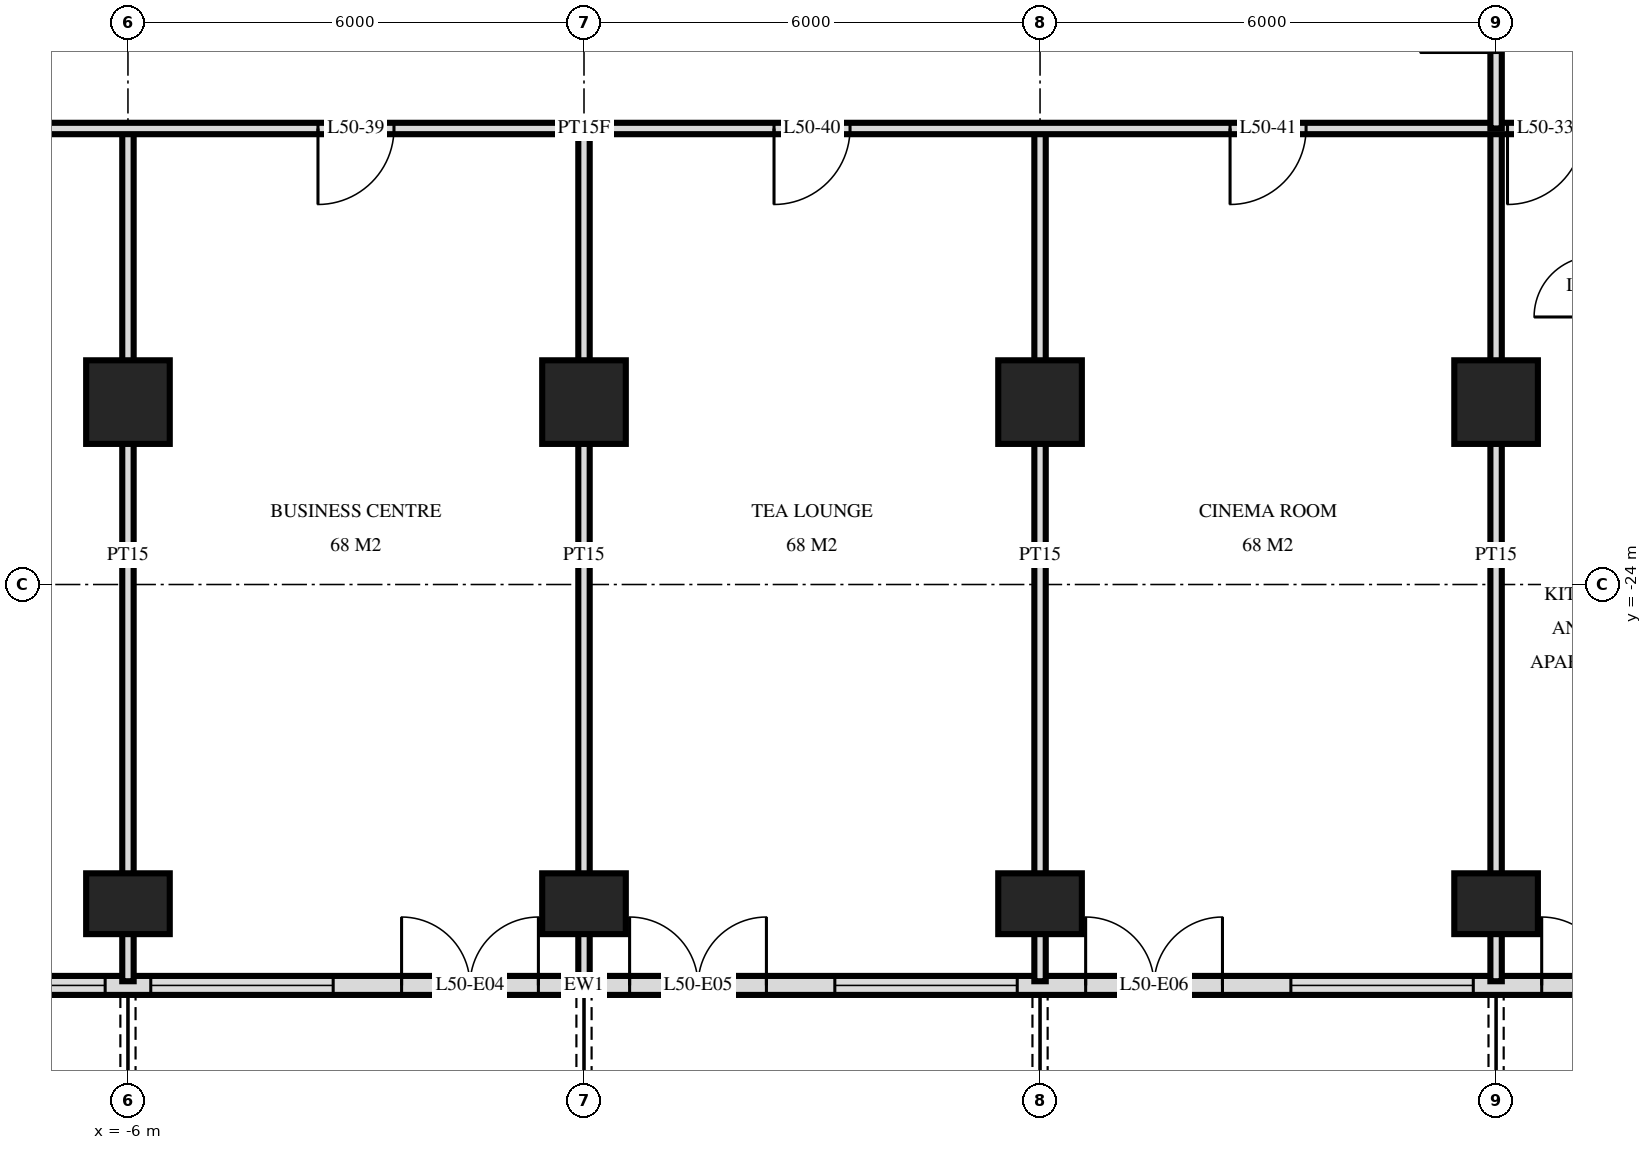
"""IFC4 building model, lengths in metres.
Left out: names, types, materials, properties, quantities, classifications, styles, units other than length and angle.
Written with IfcOpenShell. Run it as: python <this file> out.ifc"""

import sys

from ifc_helpers import new_model, si_unit, direction, frame, frame_2d, origin, origin_2d, place, context, subcontext, project, spatial, rectangle, extrude, element, fill, save


model = new_model("IFC4")
c1 = context("Model", 3, precision=1e-05, world=origin(), true_north=direction((0.0, 1.0)))
c2 = subcontext(c1, "Body", "Model", "MODEL_VIEW")
j1 = project(units=[si_unit("LENGTHUNIT", "METRE"), si_unit("PLANEANGLEUNIT", "RADIAN")], contexts=[c1])
p1 = place(None, origin())
s1 = spatial("IfcSite", under=j1, at=p1, CompositionType="ELEMENT")
p2 = place(p1, origin())
s2 = spatial("IfcBuilding", under=s1, at=p2, CompositionType="ELEMENT")
p3 = place(p2, frame((0.0, 0.0, 194.1)))
s3 = spatial("IfcBuildingStorey", under=s2, at=p3, CompositionType="ELEMENT", Elevation=194.1)
p4 = place(p3, frame((-6.0, -28.2, 0.0), z_axis=(0.0, 0.0, 1.0), x_axis=(1.0, 0.0, 0.0)))
e1 = element("IfcColumn", 1, at=p4, inside=s3, PredefinedType="COLUMN", context=c2, shape_type="SweptSolid", body=[
    extrude(rectangle(XDim=1.1, YDim=0.8, at=origin_2d()), origin(), (0.0, 0.0, 1.0), 3.5),
])
p5 = place(p3, frame((-6.0, -21.6, 0.0), z_axis=(0.0, 0.0, 1.0), x_axis=(1.0, 0.0, 0.0)))
e2 = element("IfcColumn", 2, at=p5, inside=s3, PredefinedType="COLUMN", context=c2, shape_type="SweptSolid", body=[
    extrude(rectangle(XDim=1.1, YDim=1.1, at=origin_2d()), origin(), (0.0, 0.0, 1.0), 3.5),
])
p6 = place(p3, frame((0.0, -28.2, 0.0), z_axis=(0.0, 0.0, 1.0), x_axis=(1.0, 0.0, 0.0)))
e3 = element("IfcColumn", 3, at=p6, inside=s3, PredefinedType="COLUMN", context=c2, shape_type="SweptSolid", body=[
    extrude(rectangle(XDim=1.1, YDim=0.8, at=origin_2d()), origin(), (0.0, 0.0, 1.0), 3.5),
])
p7 = place(p3, frame((0.0, -21.6, 0.0), z_axis=(0.0, 0.0, 1.0), x_axis=(1.0, 0.0, 0.0)))
e4 = element("IfcColumn", 4, at=p7, inside=s3, PredefinedType="COLUMN", context=c2, shape_type="SweptSolid", body=[
    extrude(rectangle(XDim=1.1, YDim=1.1, at=origin_2d()), origin(), (0.0, 0.0, 1.0), 3.5),
])
p8 = place(p3, frame((6.0, -28.2, 0.0), z_axis=(0.0, 0.0, 1.0), x_axis=(1.0, 0.0, 0.0)))
e5 = element("IfcColumn", 5, at=p8, inside=s3, PredefinedType="COLUMN", context=c2, shape_type="SweptSolid", body=[
    extrude(rectangle(XDim=1.1, YDim=0.8, at=origin_2d()), origin(), (0.0, 0.0, 1.0), 3.5),
])
p9 = place(p3, frame((6.0, -21.6, 0.0), z_axis=(0.0, 0.0, 1.0), x_axis=(1.0, 0.0, 0.0)))
e6 = element("IfcColumn", 6, at=p9, inside=s3, PredefinedType="COLUMN", context=c2, shape_type="SweptSolid", body=[
    extrude(rectangle(XDim=1.1, YDim=1.1, at=origin_2d()), origin(), (0.0, 0.0, 1.0), 3.5),
])
p10 = place(p3, frame((12.0, -28.2, 0.0), z_axis=(0.0, 0.0, 1.0), x_axis=(1.0, 0.0, 0.0)))
e7 = element("IfcColumn", 7, at=p10, inside=s3, PredefinedType="COLUMN", context=c2, shape_type="SweptSolid", body=[
    extrude(rectangle(XDim=1.1, YDim=0.8, at=origin_2d()), origin(), (0.0, 0.0, 1.0), 3.5),
])
p11 = place(p3, frame((12.0, -21.6, 0.0), z_axis=(0.0, 0.0, 1.0), x_axis=(1.0, 0.0, 0.0)))
e8 = element("IfcColumn", 8, at=p11, inside=s3, PredefinedType="COLUMN", context=c2, shape_type="SweptSolid", body=[
    extrude(rectangle(XDim=1.1, YDim=1.1, at=origin_2d()), origin(), (0.0, 0.0, 1.0), 3.5),
])
p12 = place(p3, frame((-22.475, -29.275, 0.0), z_axis=(0.0, 0.0, 1.0), x_axis=(1.0, 0.0, 0.0)))
e9 = element("IfcWall", 9, at=p12, inside=s3, PredefinedType="SOLIDWALL", context=c2, shape_type="SweptSolid", body=[
    extrude(rectangle(XDim=44.951, YDim=0.25, at=frame_2d((22.475, 0.0))), origin(), (0.0, 0.0, 1.0), 3.22),
])
p13 = place(p12, frame((0.575, 0.0, 0.0)))
e10 = element("IfcOpeningElement", 10, at=p13, cuts=e9, PredefinedType="OPENING", context=c2, shape_type="SweptSolid", body=[
    extrude(rectangle(XDim=1.8, YDim=2.4, at=frame_2d((0.9, 1.2))), frame((0.0, 0.135, 0.0), z_axis=(0.0, -1.0, 0.0), x_axis=(1.0, 0.0, 0.0)), (0.0, 0.0, 1.0), 0.27),
])
p14 = place(p12, frame((6.575, 0.0, 0.0)))
e11 = element("IfcOpeningElement", 11, at=p14, cuts=e9, PredefinedType="OPENING", context=c2, shape_type="SweptSolid", body=[
    extrude(rectangle(XDim=1.8, YDim=2.4, at=frame_2d((0.9, 1.2))), frame((0.0, 0.135, 0.0), z_axis=(0.0, -1.0, 0.0), x_axis=(1.0, 0.0, 0.0)), (0.0, 0.0, 1.0), 0.27),
])
p15 = place(p12, frame((11.075, 0.0, 0.0)))
e12 = element("IfcOpeningElement", 12, at=p15, cuts=e9, PredefinedType="OPENING", context=c2, shape_type="SweptSolid", body=[
    extrude(rectangle(XDim=1.8, YDim=2.4, at=frame_2d((0.9, 1.2))), frame((0.0, 0.135, 0.0), z_axis=(0.0, -1.0, 0.0), x_axis=(1.0, 0.0, 0.0)), (0.0, 0.0, 1.0), 0.27),
])
p16 = place(p12, frame((13.775, 0.0, 0.9)))
e13 = element("IfcOpeningElement", 13, at=p16, cuts=e9, PredefinedType="OPENING", context=c2, shape_type="SweptSolid", body=[
    extrude(rectangle(XDim=2.4, YDim=1.5, at=frame_2d((1.2, 0.75))), frame((0.0, 0.135, 0.0), z_axis=(0.0, -1.0, 0.0), x_axis=(1.0, 0.0, 0.0)), (0.0, 0.0, 1.0), 0.27),
])
p17 = place(p12, frame((16.775, 0.0, 0.9)))
e14 = element("IfcOpeningElement", 14, at=p17, cuts=e9, PredefinedType="OPENING", context=c2, shape_type="SweptSolid", body=[
    extrude(rectangle(XDim=2.4, YDim=1.5, at=frame_2d((1.2, 0.75))), frame((0.0, 0.135, 0.0), z_axis=(0.0, -1.0, 0.0), x_axis=(1.0, 0.0, 0.0)), (0.0, 0.0, 1.0), 0.27),
])
p18 = place(p12, frame((20.075, 0.0, 0.0)))
e15 = element("IfcOpeningElement", 15, at=p18, cuts=e9, PredefinedType="OPENING", context=c2, shape_type="SweptSolid", body=[
    extrude(rectangle(XDim=1.8, YDim=2.4, at=frame_2d((0.9, 1.2))), frame((0.0, 0.135, 0.0), z_axis=(0.0, -1.0, 0.0), x_axis=(1.0, 0.0, 0.0)), (0.0, 0.0, 1.0), 0.27),
])
p19 = place(p12, frame((23.075, 0.0, 0.0)))
e16 = element("IfcOpeningElement", 16, at=p19, cuts=e9, PredefinedType="OPENING", context=c2, shape_type="SweptSolid", body=[
    extrude(rectangle(XDim=1.8, YDim=2.4, at=frame_2d((0.9, 1.2))), frame((0.0, 0.135, 0.0), z_axis=(0.0, -1.0, 0.0), x_axis=(1.0, 0.0, 0.0)), (0.0, 0.0, 1.0), 0.27),
])
p20 = place(p12, frame((25.775, 0.0, 0.9)))
e17 = element("IfcOpeningElement", 17, at=p20, cuts=e9, PredefinedType="OPENING", context=c2, shape_type="SweptSolid", body=[
    extrude(rectangle(XDim=2.4, YDim=1.5, at=frame_2d((1.2, 0.75))), frame((0.0, 0.135, 0.0), z_axis=(0.0, -1.0, 0.0), x_axis=(1.0, 0.0, 0.0)), (0.0, 0.0, 1.0), 0.27),
])
p21 = place(p12, frame((29.075, 0.0, 0.0)))
e18 = element("IfcOpeningElement", 18, at=p21, cuts=e9, PredefinedType="OPENING", context=c2, shape_type="SweptSolid", body=[
    extrude(rectangle(XDim=1.8, YDim=2.4, at=frame_2d((0.9, 1.2))), frame((0.0, 0.135, 0.0), z_axis=(0.0, -1.0, 0.0), x_axis=(1.0, 0.0, 0.0)), (0.0, 0.0, 1.0), 0.27),
])
p22 = place(p12, frame((31.775, 0.0, 0.9)))
e19 = element("IfcOpeningElement", 19, at=p22, cuts=e9, PredefinedType="OPENING", context=c2, shape_type="SweptSolid", body=[
    extrude(rectangle(XDim=2.4, YDim=1.5, at=frame_2d((1.2, 0.75))), frame((0.0, 0.135, 0.0), z_axis=(0.0, -1.0, 0.0), x_axis=(1.0, 0.0, 0.0)), (0.0, 0.0, 1.0), 0.27),
])
p23 = place(p12, frame((35.075, 0.0, 0.0)))
e20 = element("IfcOpeningElement", 20, at=p23, cuts=e9, PredefinedType="OPENING", context=c2, shape_type="SweptSolid", body=[
    extrude(rectangle(XDim=1.8, YDim=2.4, at=frame_2d((0.9, 1.2))), frame((0.0, 0.135, 0.0), z_axis=(0.0, -1.0, 0.0), x_axis=(1.0, 0.0, 0.0)), (0.0, 0.0, 1.0), 0.27),
])
p24 = place(p12, frame((37.775, 0.0, 0.9)))
e21 = element("IfcOpeningElement", 21, at=p24, cuts=e9, PredefinedType="OPENING", context=c2, shape_type="SweptSolid", body=[
    extrude(rectangle(XDim=2.4, YDim=1.5, at=frame_2d((1.2, 0.75))), frame((0.0, 0.135, 0.0), z_axis=(0.0, -1.0, 0.0), x_axis=(1.0, 0.0, 0.0)), (0.0, 0.0, 1.0), 0.27),
])
p25 = place(p12, frame((41.075, 0.0, 0.0)))
e22 = element("IfcOpeningElement", 22, at=p25, cuts=e9, PredefinedType="OPENING", context=c2, shape_type="SweptSolid", body=[
    extrude(rectangle(XDim=1.8, YDim=2.4, at=frame_2d((0.9, 1.2))), frame((0.0, 0.135, 0.0), z_axis=(0.0, -1.0, 0.0), x_axis=(1.0, 0.0, 0.0)), (0.0, 0.0, 1.0), 0.27),
])
p26 = place(p3, frame((12.0, -18.0, 0.0), z_axis=(0.0, 0.0, 1.0), x_axis=(0.0, 1.0, 0.0)))
e23 = element("IfcWall", 23, at=p26, inside=s3, PredefinedType="PARTITIONING", context=c2, shape_type="SweptSolid", body=[
    extrude(rectangle(XDim=2.95, YDim=0.15, at=frame_2d((1.475, 0.0))), origin(), (0.0, 0.0, 1.0), 3.22),
])
p27 = place(p26, frame((1.0, 0.0, 0.0)))
e24 = element("IfcOpeningElement", 24, at=p27, cuts=e23, PredefinedType="OPENING", context=c2, shape_type="SweptSolid", body=[
    extrude(rectangle(XDim=1.0, YDim=2.1, at=frame_2d((0.5, 1.05))), frame((0.0, 0.085, 0.0), z_axis=(0.0, -1.0, 0.0), x_axis=(1.0, 0.0, 0.0)), (0.0, 0.0, 1.0), 0.17),
])
for number, where, z_axis, x_axis in (
    (25, (12.0, -29.22, 0.0), (0.0, 0.0, 1.0), (0.0, 1.0, 0.0)),
    (26, (6.0, -29.22, 0.0), (0.0, 0.0, 1.0), (0.0, 1.0, 0.0)),
    (27, (0.0, -29.22, 0.0), (0.0, 0.0, 1.0), (0.0, 1.0, 0.0)),
    (28, (-6.0, -29.22, 0.0), (0.0, 0.0, 1.0), (0.0, 1.0, 0.0)),
):
    element("IfcWall", number, at=place(p3, frame(where, z_axis=z_axis, x_axis=x_axis)), inside=s3, PredefinedType="PARTITIONING", context=c2, shape_type="SweptSolid", body=[
        extrude(rectangle(XDim=11.22, YDim=0.15, at=frame_2d((5.61, 0.0))), origin(), (0.0, 0.0, 1.0), 3.22),
    ])
p28 = place(p3, frame((-26.82, -18.0, 0.0), z_axis=(0.0, 0.0, 1.0), x_axis=(1.0, 0.0, 0.0)))
e29 = element("IfcWall", 29, at=p28, inside=s3, PredefinedType="PARTITIONING", context=c2, shape_type="SweptSolid", body=[
    extrude(rectangle(XDim=53.64, YDim=0.15, at=frame_2d((26.82, 0.0))), origin(), (0.0, 0.0, 1.0), 3.22),
])
p29 = place(p28, frame((11.32, 0.0, 0.0)))
e30 = element("IfcOpeningElement", 30, at=p29, cuts=e29, PredefinedType="OPENING", context=c2, shape_type="SweptSolid", body=[
    extrude(rectangle(XDim=1.0, YDim=2.1, at=frame_2d((0.5, 1.05))), frame((0.0, 0.085, 0.0), z_axis=(0.0, -1.0, 0.0), x_axis=(1.0, 0.0, 0.0)), (0.0, 0.0, 1.0), 0.17),
])
p30 = place(p28, frame((3.22, 0.0, 0.0)))
e31 = element("IfcOpeningElement", 31, at=p30, cuts=e29, PredefinedType="OPENING", context=c2, shape_type="SweptSolid", body=[
    extrude(rectangle(XDim=1.0, YDim=2.1, at=frame_2d((0.5, 1.05))), frame((0.0, 0.085, 0.0), z_axis=(0.0, -1.0, 0.0), x_axis=(1.0, 0.0, 0.0)), (0.0, 0.0, 1.0), 0.17),
])
p31 = place(p28, frame((5.02, 0.0, 0.0)))
e32 = element("IfcOpeningElement", 32, at=p31, cuts=e29, PredefinedType="OPENING", context=c2, shape_type="SweptSolid", body=[
    extrude(rectangle(XDim=1.0, YDim=2.1, at=frame_2d((0.5, 1.05))), frame((0.0, 0.085, 0.0), z_axis=(0.0, -1.0, 0.0), x_axis=(1.0, 0.0, 0.0)), (0.0, 0.0, 1.0), 0.17),
])
p32 = place(p28, frame((38.97, 0.0, 0.0)))
e33 = element("IfcOpeningElement", 33, at=p32, cuts=e29, PredefinedType="OPENING", context=c2, shape_type="SweptSolid", body=[
    extrude(rectangle(XDim=1.0, YDim=2.1, at=frame_2d((0.5, 1.05))), frame((0.0, 0.085, 0.0), z_axis=(0.0, -1.0, 0.0), x_axis=(1.0, 0.0, 0.0)), (0.0, 0.0, 1.0), 0.17),
])
p33 = place(p28, frame((48.72, 0.0, 0.0)))
e34 = element("IfcOpeningElement", 34, at=p33, cuts=e29, PredefinedType="OPENING", context=c2, shape_type="SweptSolid", body=[
    extrude(rectangle(XDim=1.0, YDim=2.1, at=frame_2d((0.5, 1.05))), frame((0.0, 0.085, 0.0), z_axis=(0.0, -1.0, 0.0), x_axis=(1.0, 0.0, 0.0)), (0.0, 0.0, 1.0), 0.17),
])
p34 = place(p28, frame((46.92, 0.0, 0.0)))
e35 = element("IfcOpeningElement", 35, at=p34, cuts=e29, PredefinedType="OPENING", context=c2, shape_type="SweptSolid", body=[
    extrude(rectangle(XDim=1.0, YDim=2.1, at=frame_2d((0.5, 1.05))), frame((0.0, 0.085, 0.0), z_axis=(0.0, -1.0, 0.0), x_axis=(1.0, 0.0, 0.0)), (0.0, 0.0, 1.0), 0.17),
])
p35 = place(p28, frame((17.32, 0.0, 0.0)))
e36 = element("IfcOpeningElement", 36, at=p35, cuts=e29, PredefinedType="OPENING", context=c2, shape_type="SweptSolid", body=[
    extrude(rectangle(XDim=1.0, YDim=2.1, at=frame_2d((0.5, 1.05))), frame((0.0, 0.085, 0.0), z_axis=(0.0, -1.0, 0.0), x_axis=(1.0, 0.0, 0.0)), (0.0, 0.0, 1.0), 0.17),
])
p36 = place(p28, frame((23.32, 0.0, 0.0)))
e37 = element("IfcOpeningElement", 37, at=p36, cuts=e29, PredefinedType="OPENING", context=c2, shape_type="SweptSolid", body=[
    extrude(rectangle(XDim=1.0, YDim=2.1, at=frame_2d((0.5, 1.05))), frame((0.0, 0.085, 0.0), z_axis=(0.0, -1.0, 0.0), x_axis=(1.0, 0.0, 0.0)), (0.0, 0.0, 1.0), 0.17),
])
p37 = place(p28, frame((29.32, 0.0, 0.0)))
e38 = element("IfcOpeningElement", 38, at=p37, cuts=e29, PredefinedType="OPENING", context=c2, shape_type="SweptSolid", body=[
    extrude(rectangle(XDim=1.0, YDim=2.1, at=frame_2d((0.5, 1.05))), frame((0.0, 0.085, 0.0), z_axis=(0.0, -1.0, 0.0), x_axis=(1.0, 0.0, 0.0)), (0.0, 0.0, 1.0), 0.17),
])
p38 = place(p28, frame((35.32, 0.0, 0.0)))
e39 = element("IfcOpeningElement", 39, at=p38, cuts=e29, PredefinedType="OPENING", context=c2, shape_type="SweptSolid", body=[
    extrude(rectangle(XDim=1.0, YDim=2.1, at=frame_2d((0.5, 1.05))), frame((0.0, 0.085, 0.0), z_axis=(0.0, -1.0, 0.0), x_axis=(1.0, 0.0, 0.0)), (0.0, 0.0, 1.0), 0.17),
])
p39 = place(p16, origin())
e40 = element("IfcWindow", 40, at=p39, inside=s3, PartitioningType="SINGLE_PANEL", PredefinedType="WINDOW", context=c2, shape_type="SweptSolid", body=[
    extrude(rectangle(XDim=2.4, YDim=1.5, at=frame_2d((1.2, 0.75))), frame((0.0, 0.03, 0.0), z_axis=(0.0, -1.0, 0.0), x_axis=(1.0, 0.0, 0.0)), (0.0, 0.0, 1.0), 0.06),
])
fill(e13, e40)
p40 = place(p17, origin())
e41 = element("IfcWindow", 41, at=p40, inside=s3, PartitioningType="SINGLE_PANEL", PredefinedType="WINDOW", context=c2, shape_type="SweptSolid", body=[
    extrude(rectangle(XDim=2.4, YDim=1.5, at=frame_2d((1.2, 0.75))), frame((0.0, 0.03, 0.0), z_axis=(0.0, -1.0, 0.0), x_axis=(1.0, 0.0, 0.0)), (0.0, 0.0, 1.0), 0.06),
])
fill(e14, e41)
p41 = place(p18, origin())
e42 = element("IfcDoor", 42, at=p41, inside=s3, OperationType="DOUBLE_DOOR_SINGLE_SWING", PredefinedType="DOOR", context=c2, shape_type="SweptSolid", body=[
    extrude(rectangle(XDim=1.8, YDim=2.4, at=frame_2d((0.9, 1.2))), frame((0.0, 0.025, 0.0), z_axis=(0.0, -1.0, 0.0), x_axis=(1.0, 0.0, 0.0)), (0.0, 0.0, 1.0), 0.05),
])
fill(e15, e42)
p42 = place(p19, origin())
e43 = element("IfcDoor", 43, at=p42, inside=s3, OperationType="DOUBLE_DOOR_SINGLE_SWING", PredefinedType="DOOR", context=c2, shape_type="SweptSolid", body=[
    extrude(rectangle(XDim=1.8, YDim=2.4, at=frame_2d((0.9, 1.2))), frame((0.0, 0.025, 0.0), z_axis=(0.0, -1.0, 0.0), x_axis=(1.0, 0.0, 0.0)), (0.0, 0.0, 1.0), 0.05),
])
fill(e16, e43)
p43 = place(p20, origin())
e44 = element("IfcWindow", 44, at=p43, inside=s3, PartitioningType="SINGLE_PANEL", PredefinedType="WINDOW", context=c2, shape_type="SweptSolid", body=[
    extrude(rectangle(XDim=2.4, YDim=1.5, at=frame_2d((1.2, 0.75))), frame((0.0, 0.03, 0.0), z_axis=(0.0, -1.0, 0.0), x_axis=(1.0, 0.0, 0.0)), (0.0, 0.0, 1.0), 0.06),
])
fill(e17, e44)
p44 = place(p21, origin())
e45 = element("IfcDoor", 45, at=p44, inside=s3, OperationType="DOUBLE_DOOR_SINGLE_SWING", PredefinedType="DOOR", context=c2, shape_type="SweptSolid", body=[
    extrude(rectangle(XDim=1.8, YDim=2.4, at=frame_2d((0.9, 1.2))), frame((0.0, 0.025, 0.0), z_axis=(0.0, -1.0, 0.0), x_axis=(1.0, 0.0, 0.0)), (0.0, 0.0, 1.0), 0.05),
])
fill(e18, e45)
p45 = place(p22, origin())
e46 = element("IfcWindow", 46, at=p45, inside=s3, PartitioningType="SINGLE_PANEL", PredefinedType="WINDOW", context=c2, shape_type="SweptSolid", body=[
    extrude(rectangle(XDim=2.4, YDim=1.5, at=frame_2d((1.2, 0.75))), frame((0.0, 0.03, 0.0), z_axis=(0.0, -1.0, 0.0), x_axis=(1.0, 0.0, 0.0)), (0.0, 0.0, 1.0), 0.06),
])
fill(e19, e46)
p46 = place(p23, origin())
e47 = element("IfcDoor", 47, at=p46, inside=s3, OperationType="DOUBLE_DOOR_SINGLE_SWING", PredefinedType="DOOR", context=c2, shape_type="SweptSolid", body=[
    extrude(rectangle(XDim=1.8, YDim=2.4, at=frame_2d((0.9, 1.2))), frame((0.0, 0.025, 0.0), z_axis=(0.0, -1.0, 0.0), x_axis=(1.0, 0.0, 0.0)), (0.0, 0.0, 1.0), 0.05),
])
fill(e20, e47)
p47 = place(p32, frame((0.5, 0.0, 0.0), z_axis=(0.0, 0.0, 1.0), x_axis=(-1.0, 0.0, 0.0)))
e48 = element("IfcDoor", 48, at=p47, inside=s3, OperationType="SINGLE_SWING_LEFT", PredefinedType="DOOR", context=c2, shape_type="SweptSolid", body=[
    extrude(rectangle(XDim=1.0, YDim=2.1, at=frame_2d((0.0, 1.05))), frame((0.0, -0.025, 0.0), z_axis=(0.0, 1.0, 0.0), x_axis=(-1.0, 0.0, 0.0)), (0.0, 0.0, 1.0), 0.05),
])
fill(e33, e48)
p48 = place(p36, frame((0.5, 0.0, 0.0), z_axis=(0.0, 0.0, 1.0), x_axis=(-1.0, 0.0, 0.0)))
e49 = element("IfcDoor", 49, at=p48, inside=s3, OperationType="SINGLE_SWING_LEFT", PredefinedType="DOOR", context=c2, shape_type="SweptSolid", body=[
    extrude(rectangle(XDim=1.0, YDim=2.1, at=frame_2d((0.0, 1.05))), frame((0.0, -0.025, 0.0), z_axis=(0.0, 1.0, 0.0), x_axis=(-1.0, 0.0, 0.0)), (0.0, 0.0, 1.0), 0.05),
])
fill(e37, e49)
p49 = place(p37, frame((0.5, 0.0, 0.0), z_axis=(0.0, 0.0, 1.0), x_axis=(-1.0, 0.0, 0.0)))
e50 = element("IfcDoor", 50, at=p49, inside=s3, OperationType="SINGLE_SWING_LEFT", PredefinedType="DOOR", context=c2, shape_type="SweptSolid", body=[
    extrude(rectangle(XDim=1.0, YDim=2.1, at=frame_2d((0.0, 1.05))), frame((0.0, -0.025, 0.0), z_axis=(0.0, 1.0, 0.0), x_axis=(-1.0, 0.0, 0.0)), (0.0, 0.0, 1.0), 0.05),
])
fill(e38, e50)
p50 = place(p38, frame((0.5, 0.0, 0.0), z_axis=(0.0, 0.0, 1.0), x_axis=(-1.0, 0.0, 0.0)))
e51 = element("IfcDoor", 51, at=p50, inside=s3, OperationType="SINGLE_SWING_LEFT", PredefinedType="DOOR", context=c2, shape_type="SweptSolid", body=[
    extrude(rectangle(XDim=1.0, YDim=2.1, at=frame_2d((0.0, 1.05))), frame((0.0, -0.025, 0.0), z_axis=(0.0, 1.0, 0.0), x_axis=(-1.0, 0.0, 0.0)), (0.0, 0.0, 1.0), 0.05),
])
fill(e39, e51)
save(model, sys.argv[1])
